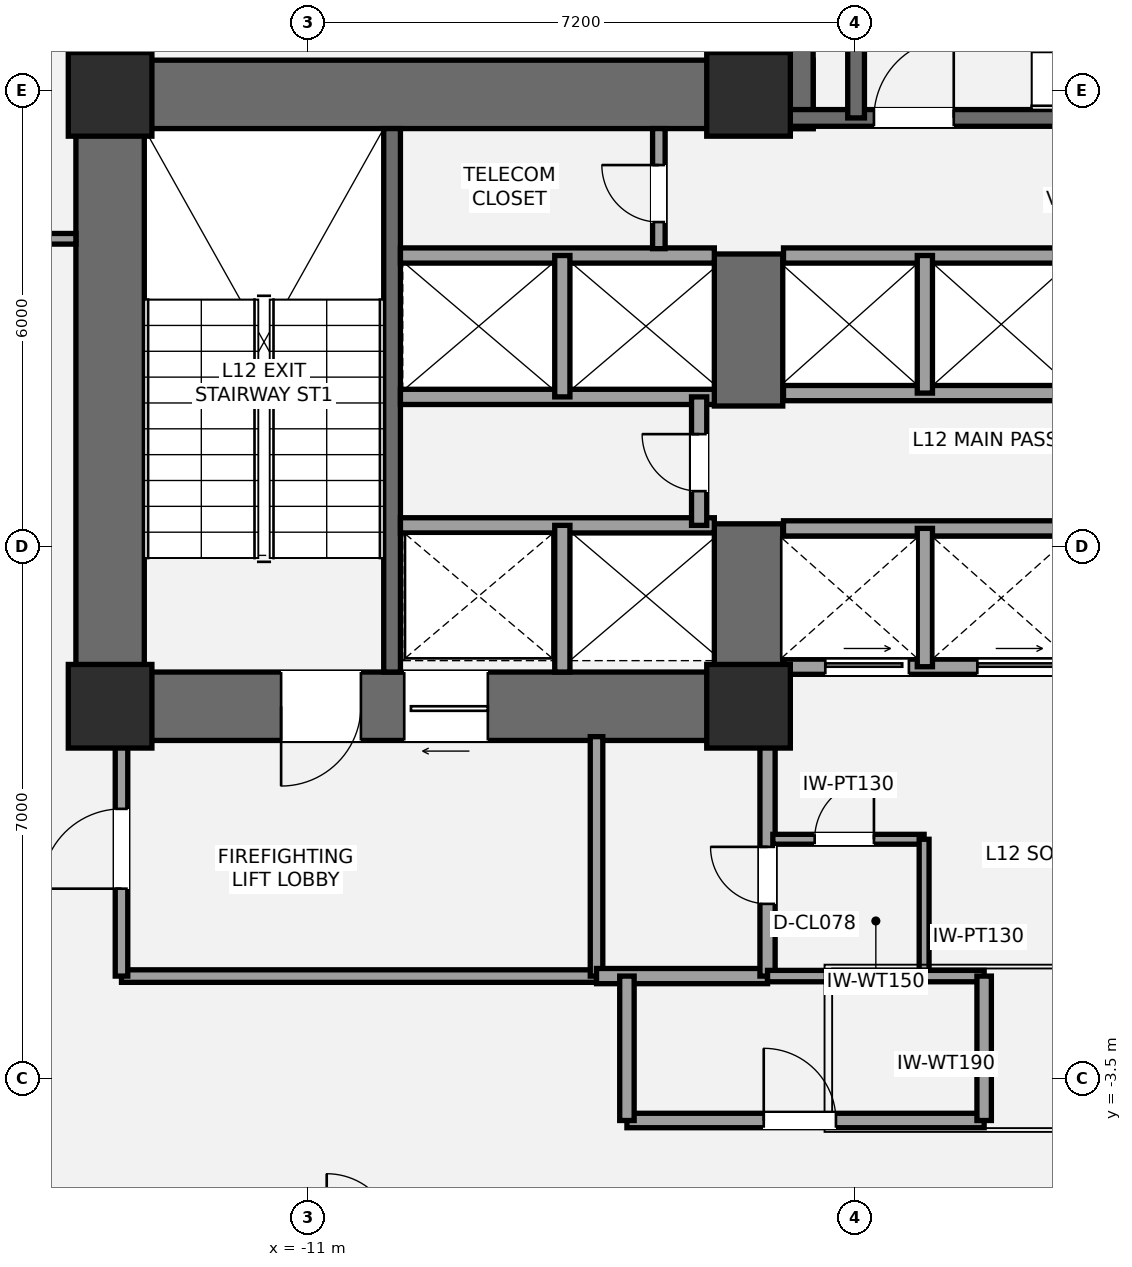
"""IFC4 building model, lengths in metres.
Left out: names, types, materials, properties, quantities, classifications, styles, units other than length and angle.
Written with IfcOpenShell. Run it as: python <this file> out.ifc"""

import sys

from ifc_helpers import new_model, si_unit, direction, frame, frame_2d, origin, origin_2d, place, context, subcontext, project, spatial, rectangle, extrude, element, fill, save


model = new_model("IFC4")
c1 = context("Model", 3, precision=1e-05, world=origin(), true_north=direction((0.0, 1.0)))
c2 = subcontext(c1, "Body", "Model", "MODEL_VIEW")
j1 = project(units=[si_unit("LENGTHUNIT", "METRE"), si_unit("PLANEANGLEUNIT", "RADIAN")], contexts=[c1])
p1 = place(None, origin())
s1 = spatial("IfcSite", under=j1, at=p1, CompositionType="ELEMENT")
p2 = place(p1, origin())
s2 = spatial("IfcBuilding", under=s1, at=p2, CompositionType="ELEMENT")
p3 = place(p2, frame((0.0, 0.0, 48.6)))
s3 = spatial("IfcBuildingStorey", under=s2, at=p3, CompositionType="ELEMENT", Elevation=48.6)
p4 = place(p3, frame((-13.6, 0.95, 0.0), z_axis=(0.0, 0.0, 1.0), x_axis=(0.0, 1.0, 0.0)))
e1 = element("IfcWall", 1, at=p4, inside=s3, PredefinedType="SHEAR", context=c2, shape_type="SweptSolid", body=[
    extrude(rectangle(XDim=8.95, YDim=0.9, at=frame_2d((4.475, 0.0))), origin(), (0.0, 0.0, 1.0), 3.6),
])
p5 = place(p3, frame((-14.05, 9.45, 0.0), z_axis=(0.0, 0.0, 1.0), x_axis=(1.0, 0.0, 0.0)))
e2 = element("IfcWall", 2, at=p5, inside=s3, PredefinedType="SHEAR", context=c2, shape_type="SweptSolid", body=[
    extrude(rectangle(XDim=9.7, YDim=0.9, at=frame_2d((4.85, 0.0))), origin(), (0.0, 0.0, 1.0), 3.6),
])
p6 = place(p3, frame((-4.75, 1.4, 0.0), z_axis=(0.0, 0.0, 1.0), x_axis=(-1.0, 0.0, 0.0)))
e3 = element("IfcWall", 3, at=p6, inside=s3, PredefinedType="SHEAR", context=c2, shape_type="SweptSolid", body=[
    extrude(rectangle(XDim=9.3, YDim=0.9, at=frame_2d((4.65, 0.0))), origin(), (0.0, 0.0, 1.0), 3.6),
])
p7 = place(p6, frame((5.55, 0.0, 0.0)))
e4 = element("IfcOpeningElement", 4, at=p7, cuts=e3, PredefinedType="OPENING", context=c2, shape_type="SweptSolid", body=[
    extrude(rectangle(XDim=1.05, YDim=2.15, at=frame_2d((0.525, 1.075))), frame((0.0, 0.46, 0.0), z_axis=(0.0, -1.0, 0.0), x_axis=(1.0, 0.0, 0.0)), (0.0, 0.0, 1.0), 0.92),
])
p8 = place(p6, frame((3.88, 0.0, 0.0)))
e5 = element("IfcOpeningElement", 5, at=p8, cuts=e3, PredefinedType="OPENING", context=c2, shape_type="SweptSolid", body=[
    extrude(rectangle(XDim=1.1, YDim=2.2, at=frame_2d((0.55, 1.1))), frame((0.0, 0.46, 0.0), z_axis=(0.0, -1.0, 0.0), x_axis=(1.0, 0.0, 0.0)), (0.0, 0.0, 1.0), 0.92),
])
p9 = place(p3, frame((-5.2, 0.95, 0.0), z_axis=(0.0, 0.0, 1.0), x_axis=(0.0, 1.0, 0.0)))
e6 = element("IfcWall", 6, at=p9, inside=s3, PredefinedType="SHEAR", context=c2, shape_type="SweptSolid", body=[
    extrude(rectangle(XDim=2.85, YDim=0.9, at=frame_2d((1.425, 0.0))), origin(), (0.0, 0.0, 1.0), 3.6),
])
p10 = place(p3, frame((-5.2, 5.35, 0.0), z_axis=(0.0, 0.0, 1.0), x_axis=(0.0, 1.0, 0.0)))
e7 = element("IfcWall", 7, at=p10, inside=s3, PredefinedType="SHEAR", context=c2, shape_type="SweptSolid", body=[
    extrude(rectangle(XDim=2.0, YDim=0.9, at=frame_2d((1.0, 0.0))), origin(), (0.0, 0.0, 1.0), 3.6),
])
p11 = place(p3, frame((-9.89, 1.85, 0.0), z_axis=(0.0, 0.0, 1.0), x_axis=(0.0, 1.0, 0.0)))
e8 = element("IfcWall", 8, at=p11, inside=s3, PredefinedType="SHEAR", context=c2, shape_type="SweptSolid", body=[
    extrude(rectangle(XDim=7.15, YDim=0.22, at=frame_2d((3.575, 0.0))), origin(), (0.0, 0.0, 1.0), 3.6),
])
p12 = place(p3, frame((-4.8, 9.0, 0.0), z_axis=(0.0, 0.0, 1.0), x_axis=(0.0, 1.0, 0.0)))
e9 = element("IfcWall", 9, at=p12, inside=s3, PredefinedType="SHEAR", context=c2, shape_type="SweptSolid", body=[
    extrude(rectangle(XDim=4.3, YDim=0.9, at=frame_2d((2.15, 0.0))), origin(), (0.0, 0.0, 1.0), 3.6),
])
p13 = place(p3, frame((-4.7, 9.14, 0.0), z_axis=(0.0, 0.0, 1.0), x_axis=(1.0, 0.0, 0.0)))
e10 = element("IfcWall", 10, at=p13, inside=s3, PredefinedType="SHEAR", context=c2, shape_type="SweptSolid", body=[
    extrude(rectangle(XDim=9.3, YDim=0.22, at=frame_2d((4.65, 0.0))), origin(), (0.0, 0.0, 1.0), 3.6),
])
p14 = place(p13, frame((1.15, 0.0, 0.0)))
e11 = element("IfcOpeningElement", 11, at=p14, cuts=e10, PredefinedType="OPENING", context=c2, shape_type="SweptSolid", body=[
    extrude(rectangle(XDim=1.05, YDim=2.15, at=frame_2d((0.525, 1.075))), frame((0.0, 0.12, 0.0), z_axis=(0.0, -1.0, 0.0), x_axis=(1.0, 0.0, 0.0)), (0.0, 0.0, 1.0), 0.24),
])
p15 = place(p3, frame((-3.785, 9.14, 0.0), z_axis=(0.0, 0.0, 1.0), x_axis=(0.0, 1.0, 0.0)))
e12 = element("IfcWall", 12, at=p15, inside=s3, PredefinedType="SHEAR", context=c2, shape_type="SweptSolid", body=[
    extrude(rectangle(XDim=3.26, YDim=0.22, at=frame_2d((1.63, 0.0))), origin(), (0.0, 0.0, 1.0), 3.6),
])
for number, where, z_axis, x_axis in (
    (13, (-13.6, 1.4, 0.0), (0.0, 0.0, 1.0), (1.0, 0.0, 0.0)),
    (14, (-13.6, 9.45, 0.0), (0.0, 0.0, 1.0), (1.0, 0.0, 0.0)),
    (15, (-5.2, 1.4, 0.0), (0.0, 0.0, 1.0), (1.0, 0.0, 0.0)),
    (16, (-5.2, 9.45, 0.0), (0.0, 0.0, 1.0), (1.0, 0.0, 0.0)),
):
    element("IfcColumn", number, at=place(p3, frame(where, z_axis=z_axis, x_axis=x_axis)), inside=s3, PredefinedType="COLUMN", context=c2, shape_type="SweptSolid", body=[
        extrude(rectangle(XDim=1.1, YDim=1.1, at=origin_2d()), origin(), (0.0, 0.0, 1.0), 3.6),
    ])
p16 = place(p3, frame((-13.45, -2.15, 0.0), z_axis=(0.0, 0.0, 1.0), x_axis=(1.0, 0.0, 0.0)))
e17 = element("IfcWall", 17, at=p16, inside=s3, PredefinedType="PARTITIONING", context=c2, shape_type="SweptSolid", body=[
    extrude(rectangle(XDim=6.25, YDim=0.165, at=frame_2d((3.125, 0.0))), origin(), (0.0, 0.0, 1.0), 2.853),
])
p17 = place(p3, frame((-13.45, -2.15, 0.0), z_axis=(0.0, 0.0, 1.0), x_axis=(0.0, 1.0, 0.0)))
e18 = element("IfcWall", 18, at=p17, inside=s3, PredefinedType="PARTITIONING", context=c2, shape_type="SweptSolid", body=[
    extrude(rectangle(XDim=3.15, YDim=0.165, at=frame_2d((1.575, 0.0))), origin(), (0.0, 0.0, 1.0), 2.853),
])
p18 = place(p17, frame((1.15, 0.0, 0.0)))
e19 = element("IfcOpeningElement", 19, at=p18, cuts=e18, PredefinedType="OPENING", context=c2, shape_type="SweptSolid", body=[
    extrude(rectangle(XDim=1.05, YDim=2.15, at=frame_2d((0.525, 1.075))), frame((0.0, 0.093, 0.0), z_axis=(0.0, -1.0, 0.0), x_axis=(1.0, 0.0, 0.0)), (0.0, 0.0, 1.0), 0.185),
])
p19 = place(p3, frame((-7.2, -2.15, 0.0), z_axis=(0.0, 0.0, 1.0), x_axis=(0.0, 1.0, 0.0)))
e20 = element("IfcWall", 20, at=p19, inside=s3, PredefinedType="PARTITIONING", context=c2, shape_type="SweptSolid", body=[
    extrude(rectangle(XDim=3.15, YDim=0.165, at=frame_2d((1.575, 0.0))), origin(), (0.0, 0.0, 1.0), 2.853),
])
p20 = place(p3, frame((-7.2, -2.15, 0.0), z_axis=(0.0, 0.0, 1.0), x_axis=(1.0, 0.0, 0.0)))
e21 = element("IfcWall", 21, at=p20, inside=s3, PredefinedType="SOLIDWALL", context=c2, shape_type="SweptSolid", body=[
    extrude(rectangle(XDim=2.25, YDim=0.2, at=frame_2d((1.125, 0.0))), origin(), (0.0, 0.0, 1.0), 3.4),
])
p21 = place(p3, frame((-4.95, -2.15, 0.0), z_axis=(0.0, 0.0, 1.0), x_axis=(0.0, 1.0, 0.0)))
e22 = element("IfcWall", 22, at=p21, inside=s3, PredefinedType="SOLIDWALL", context=c2, shape_type="SweptSolid", body=[
    extrude(rectangle(XDim=3.15, YDim=0.2, at=frame_2d((1.575, 0.0))), origin(), (0.0, 0.0, 1.0), 2.853),
])
p22 = place(p21, frame((0.95, 0.0, 0.0)))
e23 = element("IfcOpeningElement", 23, at=p22, cuts=e22, PredefinedType="OPENING", context=c2, shape_type="SweptSolid", body=[
    extrude(rectangle(XDim=0.75, YDim=2.1, at=frame_2d((0.375, 1.05))), frame((0.0, 0.11, 0.0), z_axis=(0.0, -1.0, 0.0), x_axis=(1.0, 0.0, 0.0)), (0.0, 0.0, 1.0), 0.22),
])
p23 = place(p3, frame((-4.88, -0.35, 0.0), z_axis=(0.0, 0.0, 1.0), x_axis=(1.0, 0.0, 0.0)))
e24 = element("IfcWall", 24, at=p23, inside=s3, PredefinedType="PARTITIONING", context=c2, shape_type="SweptSolid", body=[
    extrude(rectangle(XDim=1.99, YDim=0.13, at=frame_2d((0.995, 0.0))), origin(), (0.0, 0.0, 1.0), 3.4),
])
p24 = place(p23, frame((0.55, 0.0, 0.0)))
e25 = element("IfcOpeningElement", 25, at=p24, cuts=e24, PredefinedType="OPENING", context=c2, shape_type="SweptSolid", body=[
    extrude(rectangle(XDim=0.78, YDim=2.1, at=frame_2d((0.39, 1.05))), frame((0.0, 0.075, 0.0), z_axis=(0.0, -1.0, 0.0), x_axis=(1.0, 0.0, 0.0)), (0.0, 0.0, 1.0), 0.15),
])
p25 = place(p3, frame((-2.89, -2.15, 0.0), z_axis=(0.0, 0.0, 1.0), x_axis=(0.0, 1.0, 0.0)))
e26 = element("IfcWall", 26, at=p25, inside=s3, PredefinedType="PARTITIONING", context=c2, shape_type="SweptSolid", body=[
    extrude(rectangle(XDim=1.8, YDim=0.13, at=frame_2d((0.9, 0.0))), origin(), (0.0, 0.0, 1.0), 3.4),
])
p26 = place(p3, frame((-9.78, 3.78, 0.0), z_axis=(0.0, 0.0, 1.0), x_axis=(1.0, 0.0, 0.0)))
e27 = element("IfcWall", 27, at=p26, inside=s3, PredefinedType="SOLIDWALL", context=c2, shape_type="SweptSolid", body=[
    extrude(rectangle(XDim=4.13, YDim=0.2, at=frame_2d((2.065, 0.0))), origin(), (0.0, 0.0, 1.0), 3.4),
])
p27 = place(p3, frame((-7.65, 1.85, 0.0), z_axis=(0.0, 0.0, 1.0), x_axis=(0.0, 1.0, 0.0)))
e28 = element("IfcWall", 28, at=p27, inside=s3, PredefinedType="SOLIDWALL", context=c2, shape_type="SweptSolid", body=[
    extrude(rectangle(XDim=1.93, YDim=0.2, at=frame_2d((0.965, 0.0))), origin(), (0.0, 0.0, 1.0), 3.4),
])
for number, where, z_axis, x_axis in (
    (29, (-9.78, 5.47, 0.0), (0.0, 0.0, 1.0), (1.0, 0.0, 0.0)),
    (30, (-9.78, 7.33, 0.0), (0.0, 0.0, 1.0), (1.0, 0.0, 0.0)),
):
    element("IfcWall", number, at=place(p3, frame(where, z_axis=z_axis, x_axis=x_axis)), inside=s3, PredefinedType="SOLIDWALL", context=c2, shape_type="SweptSolid", body=[
        extrude(rectangle(XDim=4.13, YDim=0.2, at=frame_2d((2.065, 0.0))), origin(), (0.0, 0.0, 1.0), 3.4),
    ])
p28 = place(p3, frame((-7.65, 5.47, 0.0), z_axis=(0.0, 0.0, 1.0), x_axis=(0.0, 1.0, 0.0)))
e31 = element("IfcWall", 31, at=p28, inside=s3, PredefinedType="SOLIDWALL", context=c2, shape_type="SweptSolid", body=[
    extrude(rectangle(XDim=1.86, YDim=0.2, at=frame_2d((0.93, 0.0))), origin(), (0.0, 0.0, 1.0), 3.4),
])
p29 = place(p3, frame((-5.85, 3.78, 0.0), z_axis=(0.0, 0.0, 1.0), x_axis=(0.0, 1.0, 0.0)))
e32 = element("IfcWall", 32, at=p29, inside=s3, PredefinedType="SOLIDWALL", context=c2, shape_type="SweptSolid", body=[
    extrude(rectangle(XDim=1.69, YDim=0.2, at=frame_2d((0.845, 0.0))), origin(), (0.0, 0.0, 1.0), 3.4),
])
p30 = place(p29, frame((0.45, 0.0, 0.0)))
e33 = element("IfcOpeningElement", 33, at=p30, cuts=e32, PredefinedType="OPENING", context=c2, shape_type="SweptSolid", body=[
    extrude(rectangle(XDim=0.75, YDim=2.1, at=frame_2d((0.375, 1.05))), frame((0.0, 0.11, 0.0), z_axis=(0.0, -1.0, 0.0), x_axis=(1.0, 0.0, 0.0)), (0.0, 0.0, 1.0), 0.22),
])
p31 = place(p3, frame((-4.74, 1.92, 0.0), z_axis=(0.0, 0.0, 1.0), x_axis=(1.0, 0.0, 0.0)))
e34 = element("IfcWall", 34, at=p31, inside=s3, PredefinedType="SOLIDWALL", context=c2, shape_type="SweptSolid", body=[
    extrude(rectangle(XDim=3.86, YDim=0.2, at=frame_2d((1.93, 0.0))), origin(), (0.0, 0.0, 1.0), 2.39),
])
p32 = place(p31, frame((0.55, 0.0, 0.0)))
e35 = element("IfcOpeningElement", 35, at=p32, cuts=e34, PredefinedType="OPENING", context=c2, shape_type="SweptSolid", body=[
    extrude(rectangle(XDim=1.1, YDim=2.2, at=frame_2d((0.55, 1.1))), frame((0.0, 0.11, 0.0), z_axis=(0.0, -1.0, 0.0), x_axis=(1.0, 0.0, 0.0)), (0.0, 0.0, 1.0), 0.22),
])
p33 = place(p31, frame((2.55, 0.0, 0.0)))
e36 = element("IfcOpeningElement", 36, at=p33, cuts=e34, PredefinedType="OPENING", context=c2, shape_type="SweptSolid", body=[
    extrude(rectangle(XDim=1.1, YDim=2.2, at=frame_2d((0.55, 1.1))), frame((0.0, 0.11, 0.0), z_axis=(0.0, -1.0, 0.0), x_axis=(1.0, 0.0, 0.0)), (0.0, 0.0, 1.0), 0.22),
])
p34 = place(p3, frame((-4.74, 3.74, 0.0), z_axis=(0.0, 0.0, 1.0), x_axis=(1.0, 0.0, 0.0)))
e37 = element("IfcWall", 37, at=p34, inside=s3, PredefinedType="SOLIDWALL", context=c2, shape_type="SweptSolid", body=[
    extrude(rectangle(XDim=3.86, YDim=0.2, at=frame_2d((1.93, 0.0))), origin(), (0.0, 0.0, 1.0), 3.4),
])
p35 = place(p3, frame((-2.88, 1.92, 0.0), z_axis=(0.0, 0.0, 1.0), x_axis=(0.0, 1.0, 0.0)))
e38 = element("IfcWall", 38, at=p35, inside=s3, PredefinedType="SOLIDWALL", context=c2, shape_type="SweptSolid", body=[
    extrude(rectangle(XDim=1.82, YDim=0.2, at=frame_2d((0.91, 0.0))), origin(), (0.0, 0.0, 1.0), 3.4),
])
for number, where, z_axis, x_axis in (
    (39, (-4.74, 5.52, 0.0), (0.0, 0.0, 1.0), (1.0, 0.0, 0.0)),
    (40, (-4.74, 7.33, 0.0), (0.0, 0.0, 1.0), (1.0, 0.0, 0.0)),
):
    element("IfcWall", number, at=place(p3, frame(where, z_axis=z_axis, x_axis=x_axis)), inside=s3, PredefinedType="SOLIDWALL", context=c2, shape_type="SweptSolid", body=[
        extrude(rectangle(XDim=3.86, YDim=0.2, at=frame_2d((1.93, 0.0))), origin(), (0.0, 0.0, 1.0), 3.4),
    ])
p36 = place(p3, frame((-2.88, 5.52, 0.0), z_axis=(0.0, 0.0, 1.0), x_axis=(0.0, 1.0, 0.0)))
e41 = element("IfcWall", 41, at=p36, inside=s3, PredefinedType="SOLIDWALL", context=c2, shape_type="SweptSolid", body=[
    extrude(rectangle(XDim=1.81, YDim=0.2, at=frame_2d((0.905, 0.0))), origin(), (0.0, 0.0, 1.0), 3.4),
])
p37 = place(p3, frame((-6.38, 7.42, 0.0), z_axis=(0.0, 0.0, 1.0), x_axis=(0.0, 1.0, 0.0)))
e42 = element("IfcWall", 42, at=p37, inside=s3, PredefinedType="PARTITIONING", context=c2, shape_type="SweptSolid", body=[
    extrude(rectangle(XDim=1.58, YDim=0.165, at=frame_2d((0.79, 0.0))), origin(), (0.0, 0.0, 1.0), 3.4),
])
p38 = place(p37, frame((0.35, 0.0, 0.0)))
e43 = element("IfcOpeningElement", 43, at=p38, cuts=e42, PredefinedType="OPENING", context=c2, shape_type="SweptSolid", body=[
    extrude(rectangle(XDim=0.75, YDim=2.1, at=frame_2d((0.375, 1.05))), frame((0.0, 0.093, 0.0), z_axis=(0.0, -1.0, 0.0), x_axis=(1.0, 0.0, 0.0)), (0.0, 0.0, 1.0), 0.185),
])
p39 = place(p3, frame((-6.8, -4.05, 0.0), z_axis=(0.0, 0.0, 1.0), x_axis=(1.0, 0.0, 0.0)))
e44 = element("IfcWall", 44, at=p39, inside=s3, PredefinedType="PLUMBINGWALL", context=c2, shape_type="SweptSolid", body=[
    extrude(rectangle(XDim=4.7, YDim=0.19, at=frame_2d((2.35, 0.0))), origin(), (0.0, 0.0, 1.0), 2.853),
])
p40 = place(p39, frame((1.8, 0.0, 0.0)))
e45 = element("IfcOpeningElement", 45, at=p40, cuts=e44, PredefinedType="OPENING", context=c2, shape_type="SweptSolid", body=[
    extrude(rectangle(XDim=0.95, YDim=2.15, at=frame_2d((0.475, 1.075))), frame((0.0, 0.105, 0.0), z_axis=(0.0, -1.0, 0.0), x_axis=(1.0, 0.0, 0.0)), (0.0, 0.0, 1.0), 0.21),
])
p41 = place(p3, frame((-4.95, -2.15, 0.0), z_axis=(0.0, 0.0, 1.0), x_axis=(1.0, 0.0, 0.0)))
e46 = element("IfcWall", 46, at=p41, inside=s3, PredefinedType="PLUMBINGWALL", context=c2, shape_type="SweptSolid", body=[
    extrude(rectangle(XDim=2.85, YDim=0.15, at=frame_2d((1.425, 0.0))), origin(), (0.0, 0.0, 1.0), 2.853),
])
for number, where, z_axis, x_axis in (
    (47, (-6.8, -4.05, 0.0), (0.0, 0.0, 1.0), (0.0, 1.0, 0.0)),
    (48, (-2.1, -4.05, 0.0), (0.0, 0.0, 1.0), (0.0, 1.0, 0.0)),
):
    element("IfcWall", number, at=place(p3, frame(where, z_axis=z_axis, x_axis=x_axis)), inside=s3, PredefinedType="PLUMBINGWALL", context=c2, shape_type="SweptSolid", body=[
        extrude(rectangle(XDim=1.9, YDim=0.19, at=frame_2d((0.95, 0.0))), origin(), (0.0, 0.0, 1.0), 3.4),
    ])
p42 = place(p3, frame((-24.856, 7.55, 0.0), z_axis=(0.0, 0.0, 1.0), x_axis=(1.0, 0.0, 0.0)))
e49 = element("IfcWall", 49, at=p42, inside=s3, PredefinedType="PARTITIONING", context=c2, shape_type="SweptSolid", body=[
    extrude(rectangle(XDim=10.806, YDim=0.14, at=frame_2d((5.403, 0.0))), origin(), (0.0, 0.0, 1.0), 2.853),
])
p43 = place(p42, frame((1.939, 0.0, 0.0)))
e50 = element("IfcOpeningElement", 50, at=p43, cuts=e49, PredefinedType="OPENING", context=c2, shape_type="SweptSolid", body=[
    extrude(rectangle(XDim=0.92, YDim=2.15, at=frame_2d((0.46, 1.075))), frame((0.0, 0.08, 0.0), z_axis=(0.0, -1.0, 0.0), x_axis=(1.0, 0.0, 0.0)), (0.0, 0.0, 1.0), 0.16),
])
p44 = place(p7, origin())
e51 = element("IfcDoor", 51, at=p44, inside=s3, OperationType="SINGLE_SWING_RIGHT", PredefinedType="DOOR", context=c2, shape_type="SweptSolid", body=[
    extrude(rectangle(XDim=1.05, YDim=2.15, at=frame_2d((0.525, 1.075))), frame((0.0, 0.025, 0.0), z_axis=(0.0, -1.0, 0.0), x_axis=(1.0, 0.0, 0.0)), (0.0, 0.0, 1.0), 0.05),
])
fill(e4, e51)
p45 = place(p14, origin())
e52 = element("IfcDoor", 52, at=p45, inside=s3, OperationType="SINGLE_SWING_RIGHT", PredefinedType="DOOR", context=c2, shape_type="SweptSolid", body=[
    extrude(rectangle(XDim=1.05, YDim=2.15, at=frame_2d((0.525, 1.075))), frame((0.0, 0.025, 0.0), z_axis=(0.0, -1.0, 0.0), x_axis=(1.0, 0.0, 0.0)), (0.0, 0.0, 1.0), 0.05),
])
fill(e11, e52)
p46 = place(p18, origin())
e53 = element("IfcDoor", 53, at=p46, inside=s3, OperationType="SINGLE_SWING_LEFT", PredefinedType="DOOR", context=c2, shape_type="SweptSolid", body=[
    extrude(rectangle(XDim=1.05, YDim=2.15, at=frame_2d((0.525, 1.075))), frame((0.0, 0.025, 0.0), z_axis=(0.0, -1.0, 0.0), x_axis=(1.0, 0.0, 0.0)), (0.0, 0.0, 1.0), 0.05),
])
fill(e19, e53)
p47 = place(p22, origin())
e54 = element("IfcDoor", 54, at=p47, inside=s3, OperationType="SINGLE_SWING_RIGHT", PredefinedType="DOOR", context=c2, shape_type="SweptSolid", body=[
    extrude(rectangle(XDim=0.75, YDim=2.1, at=frame_2d((0.375, 1.05))), frame((0.0, 0.025, 0.0), z_axis=(0.0, -1.0, 0.0), x_axis=(1.0, 0.0, 0.0)), (0.0, 0.0, 1.0), 0.05),
])
fill(e23, e54)
p48 = place(p24, origin())
e55 = element("IfcDoor", 55, at=p48, inside=s3, OperationType="SINGLE_SWING_RIGHT", PredefinedType="DOOR", context=c2, shape_type="SweptSolid", body=[
    extrude(rectangle(XDim=0.78, YDim=2.1, at=frame_2d((0.39, 1.05))), frame((0.0, 0.025, 0.0), z_axis=(0.0, -1.0, 0.0), x_axis=(1.0, 0.0, 0.0)), (0.0, 0.0, 1.0), 0.05),
])
fill(e25, e55)
p49 = place(p8, origin())
e56 = element("IfcDoor", 56, at=p49, inside=s3, OperationType="SLIDING_TO_LEFT", PredefinedType="DOOR", context=c2, shape_type="SweptSolid", body=[
    extrude(rectangle(XDim=1.1, YDim=2.2, at=frame_2d((0.55, 1.1))), frame((0.0, 0.025, 0.0), z_axis=(0.0, -1.0, 0.0), x_axis=(1.0, 0.0, 0.0)), (0.0, 0.0, 1.0), 0.05),
])
fill(e5, e56)
p50 = place(p30, origin())
e57 = element("IfcDoor", 57, at=p50, inside=s3, OperationType="SINGLE_SWING_RIGHT", PredefinedType="DOOR", context=c2, shape_type="SweptSolid", body=[
    extrude(rectangle(XDim=0.75, YDim=2.1, at=frame_2d((0.375, 1.05))), frame((0.0, 0.025, 0.0), z_axis=(0.0, -1.0, 0.0), x_axis=(1.0, 0.0, 0.0)), (0.0, 0.0, 1.0), 0.05),
])
fill(e33, e57)
p51 = place(p32, origin())
e58 = element("IfcDoor", 58, at=p51, inside=s3, OperationType="SLIDING_TO_LEFT", PredefinedType="DOOR", context=c2, shape_type="SweptSolid", body=[
    extrude(rectangle(XDim=1.1, YDim=2.2, at=frame_2d((0.55, 1.1))), frame((0.0, 0.025, 0.0), z_axis=(0.0, -1.0, 0.0), x_axis=(1.0, 0.0, 0.0)), (0.0, 0.0, 1.0), 0.05),
])
fill(e35, e58)
p52 = place(p33, origin())
e59 = element("IfcDoor", 59, at=p52, inside=s3, OperationType="SLIDING_TO_LEFT", PredefinedType="DOOR", context=c2, shape_type="SweptSolid", body=[
    extrude(rectangle(XDim=1.1, YDim=2.2, at=frame_2d((0.55, 1.1))), frame((0.0, 0.025, 0.0), z_axis=(0.0, -1.0, 0.0), x_axis=(1.0, 0.0, 0.0)), (0.0, 0.0, 1.0), 0.05),
])
fill(e36, e59)
p53 = place(p38, origin())
e60 = element("IfcDoor", 60, at=p53, inside=s3, OperationType="SINGLE_SWING_RIGHT", PredefinedType="DOOR", context=c2, shape_type="SweptSolid", body=[
    extrude(rectangle(XDim=0.75, YDim=2.1, at=frame_2d((0.375, 1.05))), frame((0.0, 0.025, 0.0), z_axis=(0.0, -1.0, 0.0), x_axis=(1.0, 0.0, 0.0)), (0.0, 0.0, 1.0), 0.05),
])
fill(e43, e60)
p54 = place(p40, origin())
e61 = element("IfcDoor", 61, at=p54, inside=s3, OperationType="SINGLE_SWING_LEFT", PredefinedType="DOOR", context=c2, shape_type="SweptSolid", body=[
    extrude(rectangle(XDim=0.95, YDim=2.15, at=frame_2d((0.475, 1.075))), frame((0.0, 0.025, 0.0), z_axis=(0.0, -1.0, 0.0), x_axis=(1.0, 0.0, 0.0)), (0.0, 0.0, 1.0), 0.05),
])
fill(e45, e61)
save(model, sys.argv[1])
